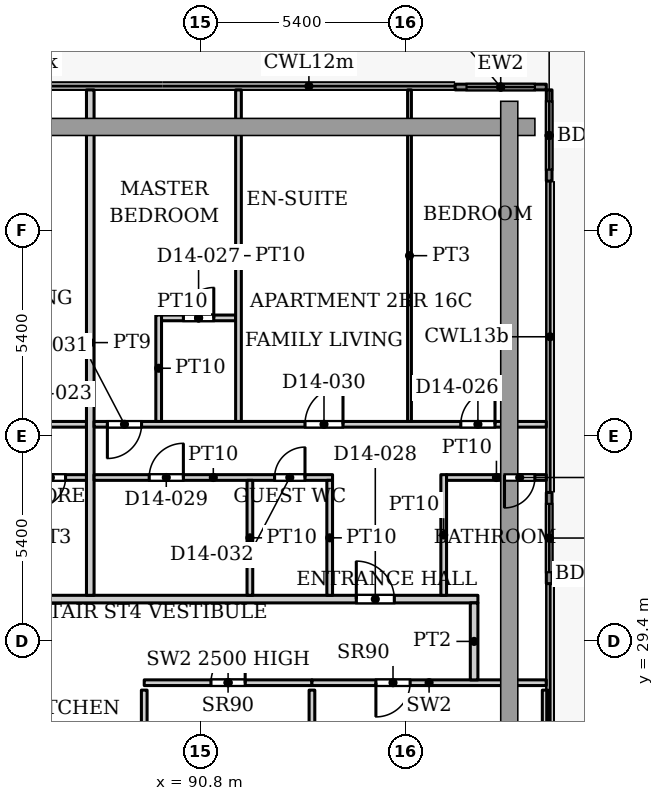
"""IFC4 building model, lengths in metres.
Left out: names, types, materials, properties, quantities, classifications, styles, units other than length and angle.
Written with IfcOpenShell. Run it as: python <this file> out.ifc"""

import sys

from ifc_helpers import new_model, si_unit, direction, frame, frame_2d, origin, place, context, subcontext, project, spatial, rectangle, extrude, source, transform, mapped, element, fill, save


model = new_model("IFC4")
c1 = context("Model", 3, precision=1e-05, world=origin(), true_north=direction((0.0, 1.0)))
c2 = subcontext(c1, "Body", "Model", "MODEL_VIEW")
j1 = project(units=[si_unit("LENGTHUNIT", "METRE"), si_unit("PLANEANGLEUNIT", "RADIAN")], contexts=[c1])
p1 = place(None, origin())
s1 = spatial("IfcSite", under=j1, at=p1, CompositionType="ELEMENT")
p2 = place(p1, origin())
s2 = spatial("IfcBuilding", under=s1, at=p2, CompositionType="ELEMENT")
p3 = place(p2, frame((0.0, 0.0, 69.5)))
s3 = spatial("IfcBuildingStorey", under=s2, at=p3, CompositionType="ELEMENT", Elevation=69.5)
p4 = place(p3, frame((97.5, 43.975, 0.0), z_axis=(0.0, 0.0, 1.0), x_axis=(1.0, 0.0, 0.0)))
e1 = element("IfcWall", 1, at=p4, inside=s3, PredefinedType="SOLIDWALL", context=c2, shape_type="SweptSolid", body=[
    extrude(rectangle(XDim=2.4, YDim=0.15, at=frame_2d((1.2, 0.0))), origin(), (0.0, 0.0, 1.0), 3.75),
])
p5 = place(p4, frame((0.3, 0.0, 0.0)))
e2 = element("IfcOpeningElement", 2, at=p5, cuts=e1, PredefinedType="OPENING", context=c2, shape_type="SweptSolid", body=[
    extrude(rectangle(XDim=1.8, YDim=2.4, at=frame_2d((0.9, 1.2))), frame((0.0, 0.085, 0.0), z_axis=(0.0, -1.0, 0.0), x_axis=(1.0, 0.0, 0.0)), (0.0, 0.0, 1.0), 0.17),
])
p6 = place(p3, frame((99.975, 43.9, 0.0), z_axis=(0.0, 0.0, 1.0), x_axis=(0.0, -1.0, 0.0)))
e3 = element("IfcWall", 3, at=p6, inside=s3, PredefinedType="SOLIDWALL", context=c2, shape_type="SweptSolid", body=[
    extrude(rectangle(XDim=2.4, YDim=0.15, at=frame_2d((1.2, 0.0))), origin(), (0.0, 0.0, 1.0), 3.75),
])
p7 = place(p6, frame((0.3, 0.0, 0.0)))
e4 = element("IfcOpeningElement", 4, at=p7, cuts=e3, PredefinedType="OPENING", context=c2, shape_type="SweptSolid", body=[
    extrude(rectangle(XDim=1.8, YDim=2.4, at=frame_2d((0.9, 1.2))), frame((0.0, 0.085, 0.0), z_axis=(0.0, -1.0, 0.0), x_axis=(1.0, 0.0, 0.0)), (0.0, 0.0, 1.0), 0.17),
])
p8 = place(p3, frame((99.975, 33.307, 0.0), z_axis=(0.0, 0.0, 1.0), x_axis=(0.0, -1.0, 0.0)))
e5 = element("IfcWall", 5, at=p8, inside=s3, PredefinedType="SOLIDWALL", context=c2, shape_type="SweptSolid", body=[
    extrude(rectangle(XDim=2.4, YDim=0.15, at=frame_2d((1.2, 0.0))), origin(), (0.0, 0.0, 1.0), 3.75),
])
p9 = place(p8, frame((0.3, 0.0, 0.0)))
e6 = element("IfcOpeningElement", 6, at=p9, cuts=e5, PredefinedType="OPENING", context=c2, shape_type="SweptSolid", body=[
    extrude(rectangle(XDim=1.8, YDim=2.4, at=frame_2d((0.9, 1.2))), frame((0.0, 0.085, 0.0), z_axis=(0.0, -1.0, 0.0), x_axis=(1.0, 0.0, 0.0)), (0.0, 0.0, 1.0), 0.17),
])
p10 = place(p3, frame((89.32, 28.3, 0.0), z_axis=(0.0, 0.0, 1.0), x_axis=(1.0, 0.0, 0.0)))
e7 = element("IfcWall", 7, at=p10, inside=s3, PredefinedType="PARTITIONING", context=c2, shape_type="SweptSolid", body=[
    extrude(rectangle(XDim=4.413, YDim=0.15, at=frame_2d((2.207, 0.0))), origin(), (0.0, 0.0, 1.0), 2.5),
])
p11 = place(p10, frame((1.756, 0.0, 0.0)))
e8 = element("IfcOpeningElement", 8, at=p11, cuts=e7, PredefinedType="OPENING", context=c2, shape_type="SweptSolid", body=[
    extrude(rectangle(XDim=0.9, YDim=2.2, at=frame_2d((0.45, 1.1))), frame((0.0, 0.085, 0.0), z_axis=(0.0, -1.0, 0.0), x_axis=(1.0, 0.0, 0.0)), (0.0, 0.0, 1.0), 0.17),
])
p12 = place(p3, frame((89.32, 25.62, 0.0), z_axis=(0.0, 0.0, 1.0), x_axis=(0.0, 1.0, 0.0)))
e9 = element("IfcWall", 9, at=p12, inside=s3, PredefinedType="PARTITIONING", context=c2, shape_type="SweptSolid", body=[
    extrude(rectangle(XDim=2.485, YDim=0.15, at=frame_2d((1.242, 0.0))), origin(), (0.0, 0.0, 1.0), 3.9),
])
p13 = place(p3, frame((93.733, 21.338, 0.0), z_axis=(0.0, 0.0, 1.0), x_axis=(0.0, 1.0, 0.0)))
e10 = element("IfcWall", 10, at=p13, inside=s3, PredefinedType="PARTITIONING", context=c2, shape_type="SweptSolid", body=[
    extrude(rectangle(XDim=6.767, YDim=0.15, at=frame_2d((3.384, 0.0))), origin(), (0.0, 0.0, 1.0), 3.9),
])
p14 = place(p3, frame((93.733, 28.3, 0.0), z_axis=(0.0, 0.0, 1.0), x_axis=(1.0, 0.0, 0.0)))
e11 = element("IfcWall", 11, at=p14, inside=s3, PredefinedType="PARTITIONING", context=c2, shape_type="SweptSolid", body=[
    extrude(rectangle(XDim=6.165, YDim=0.15, at=frame_2d((3.083, 0.0))), origin(), (0.0, 0.0, 1.0), 3.9),
])
p15 = place(p14, frame((1.683, 0.0, 0.0)))
e12 = element("IfcOpeningElement", 12, at=p15, cuts=e11, PredefinedType="OPENING", context=c2, shape_type="SweptSolid", body=[
    extrude(rectangle(XDim=0.9, YDim=2.2, at=frame_2d((0.45, 1.1))), frame((0.0, 0.085, 0.0), z_axis=(0.0, -1.0, 0.0), x_axis=(1.0, 0.0, 0.0)), (0.0, 0.0, 1.0), 0.17),
])
p16 = place(p3, frame((99.87, 21.015, 0.0), z_axis=(0.0, 0.0, 1.0), x_axis=(0.0, 1.0, 0.0)))
e13 = element("IfcWall", 13, at=p16, inside=s3, PredefinedType="PARTITIONING", context=c2, shape_type="SweptSolid", body=[
    extrude(rectangle(XDim=7.09, YDim=0.15, at=frame_2d((3.545, 0.0))), origin(), (0.0, 0.0, 1.0), 3.9),
])
p17 = place(p3, frame((55.9, 30.5, 0.0), z_axis=(0.0, 0.0, 1.0), x_axis=(1.0, 0.0, 0.0)))
e14 = element("IfcWall", 14, at=p17, inside=s3, PredefinedType="PARTITIONING", context=c2, shape_type="SweptSolid", body=[
    extrude(rectangle(XDim=42.2, YDim=0.2, at=frame_2d((21.1, 0.0))), origin(), (0.0, 0.0, 1.0), 3.6),
])
p18 = place(p17, frame((14.7, 0.0, 0.0)))
e15 = element("IfcOpeningElement", 15, at=p18, cuts=e14, PredefinedType="OPENING", context=c2, shape_type="SweptSolid", body=[
    extrude(rectangle(XDim=1.0, YDim=2.1, at=frame_2d((0.5, 1.05))), frame((0.0, 0.11, 0.0), z_axis=(0.0, -1.0, 0.0), x_axis=(1.0, 0.0, 0.0)), (0.0, 0.0, 1.0), 0.22),
])
p19 = place(p17, frame((27.9, 0.0, 0.0)))
e16 = element("IfcOpeningElement", 16, at=p19, cuts=e14, PredefinedType="OPENING", context=c2, shape_type="SweptSolid", body=[
    extrude(rectangle(XDim=1.0, YDim=2.1, at=frame_2d((0.5, 1.05))), frame((0.0, 0.11, 0.0), z_axis=(0.0, -1.0, 0.0), x_axis=(1.0, 0.0, 0.0)), (0.0, 0.0, 1.0), 0.22),
])
p20 = place(p17, frame((39.0, 0.0, 0.0)))
e17 = element("IfcOpeningElement", 17, at=p20, cuts=e14, PredefinedType="OPENING", context=c2, shape_type="SweptSolid", body=[
    extrude(rectangle(XDim=1.0, YDim=2.1, at=frame_2d((0.5, 1.05))), frame((0.0, 0.11, 0.0), z_axis=(0.0, -1.0, 0.0), x_axis=(1.0, 0.0, 0.0)), (0.0, 0.0, 1.0), 0.22),
])
p21 = place(p3, frame((74.5, 35.1, 0.0), z_axis=(0.0, 0.0, 1.0), x_axis=(1.0, 0.0, 0.0)))
e18 = element("IfcWall", 18, at=p21, inside=s3, PredefinedType="PARTITIONING", context=c2, shape_type="SweptSolid", body=[
    extrude(rectangle(XDim=13.3, YDim=0.15, at=frame_2d((6.65, 0.0))), origin(), (0.0, 0.0, 1.0), 3.6),
])
p22 = place(p21, frame((1.1, 0.0, 0.0)))
e19 = element("IfcOpeningElement", 19, at=p22, cuts=e18, PredefinedType="OPENING", context=c2, shape_type="SweptSolid", body=[
    extrude(rectangle(XDim=0.9, YDim=2.1, at=frame_2d((0.45, 1.05))), frame((0.0, 0.085, 0.0), z_axis=(0.0, -1.0, 0.0), x_axis=(1.0, 0.0, 0.0)), (0.0, 0.0, 1.0), 0.17),
])
p23 = place(p21, frame((9.95, 0.0, 0.0)))
e20 = element("IfcOpeningElement", 20, at=p23, cuts=e18, PredefinedType="OPENING", context=c2, shape_type="SweptSolid", body=[
    extrude(rectangle(XDim=1.0, YDim=2.1, at=frame_2d((0.5, 1.05))), frame((0.0, 0.085, 0.0), z_axis=(0.0, -1.0, 0.0), x_axis=(1.0, 0.0, 0.0)), (0.0, 0.0, 1.0), 0.17),
])
p24 = place(p21, frame((4.25, 0.0, 0.0)))
e21 = element("IfcOpeningElement", 21, at=p24, cuts=e18, PredefinedType="OPENING", context=c2, shape_type="SweptSolid", body=[
    extrude(rectangle(XDim=0.9, YDim=2.1, at=frame_2d((0.45, 1.05))), frame((0.0, 0.085, 0.0), z_axis=(0.0, -1.0, 0.0), x_axis=(1.0, 0.0, 0.0)), (0.0, 0.0, 1.0), 0.17),
])
p25 = place(p3, frame((85.75, 33.7, 0.0), z_axis=(0.0, 0.0, 1.0), x_axis=(1.0, 0.0, 0.0)))
e22 = element("IfcWall", 22, at=p25, inside=s3, PredefinedType="PARTITIONING", context=c2, shape_type="SweptSolid", body=[
    extrude(rectangle(XDim=2.05, YDim=0.15, at=frame_2d((1.025, 0.0))), origin(), (0.0, 0.0, 1.0), 3.6),
])
p26 = place(p25, frame((0.7, 0.0, 0.0)))
e23 = element("IfcOpeningElement", 23, at=p26, cuts=e22, PredefinedType="OPENING", context=c2, shape_type="SweptSolid", body=[
    extrude(rectangle(XDim=0.8, YDim=2.1, at=frame_2d((0.4, 1.05))), frame((0.0, 0.085, 0.0), z_axis=(0.0, -1.0, 0.0), x_axis=(1.0, 0.0, 0.0)), (0.0, 0.0, 1.0), 0.17),
])
p27 = place(p3, frame((87.9, 30.6, 0.0), z_axis=(0.0, 0.0, 1.0), x_axis=(0.0, 1.0, 0.0)))
e24 = element("IfcWall", 24, at=p27, inside=s3, PredefinedType="PARTITIONING", context=c2, shape_type="SweptSolid", body=[
    extrude(rectangle(XDim=13.3, YDim=0.2, at=frame_2d((6.65, 0.0))), origin(), (0.0, 0.0, 1.0), 3.6),
])
p28 = place(p3, frame((88.0, 33.7, 0.0), z_axis=(0.0, 0.0, 1.0), x_axis=(1.0, 0.0, 0.0)))
e25 = element("IfcWall", 25, at=p28, inside=s3, PredefinedType="PARTITIONING", context=c2, shape_type="SweptSolid", body=[
    extrude(rectangle(XDim=6.275, YDim=0.15, at=frame_2d((3.137, 0.0))), origin(), (0.0, 0.0, 1.0), 3.6),
])
p29 = place(p28, frame((1.45, 0.0, 0.0)))
e26 = element("IfcOpeningElement", 26, at=p29, cuts=e25, PredefinedType="OPENING", context=c2, shape_type="SweptSolid", body=[
    extrude(rectangle(XDim=0.9, YDim=2.1, at=frame_2d((0.45, 1.05))), frame((0.0, 0.085, 0.0), z_axis=(0.0, -1.0, 0.0), x_axis=(1.0, 0.0, 0.0)), (0.0, 0.0, 1.0), 0.17),
])
p30 = place(p28, frame((4.75, 0.0, 0.0)))
e27 = element("IfcOpeningElement", 27, at=p30, cuts=e25, PredefinedType="OPENING", context=c2, shape_type="SweptSolid", body=[
    extrude(rectangle(XDim=0.8, YDim=2.1, at=frame_2d((0.4, 1.05))), frame((0.0, 0.085, 0.0), z_axis=(0.0, -1.0, 0.0), x_axis=(1.0, 0.0, 0.0)), (0.0, 0.0, 1.0), 0.17),
])
p31 = place(p3, frame((88.0, 35.1, 0.0), z_axis=(0.0, 0.0, 1.0), x_axis=(1.0, 0.0, 0.0)))
e28 = element("IfcWall", 28, at=p31, inside=s3, PredefinedType="PARTITIONING", context=c2, shape_type="SweptSolid", body=[
    extrude(rectangle(XDim=11.9, YDim=0.15, at=frame_2d((5.95, 0.0))), origin(), (0.0, 0.0, 1.0), 3.6),
])
p32 = place(p31, frame((9.65, 0.0, 0.0)))
e29 = element("IfcOpeningElement", 29, at=p32, cuts=e28, PredefinedType="OPENING", context=c2, shape_type="SweptSolid", body=[
    extrude(rectangle(XDim=0.9, YDim=2.1, at=frame_2d((0.45, 1.05))), frame((0.0, 0.085, 0.0), z_axis=(0.0, -1.0, 0.0), x_axis=(1.0, 0.0, 0.0)), (0.0, 0.0, 1.0), 0.17),
])
p33 = place(p31, frame((5.55, 0.0, 0.0)))
e30 = element("IfcOpeningElement", 30, at=p33, cuts=e28, PredefinedType="OPENING", context=c2, shape_type="SweptSolid", body=[
    extrude(rectangle(XDim=1.0, YDim=2.1, at=frame_2d((0.5, 1.05))), frame((0.0, 0.085, 0.0), z_axis=(0.0, -1.0, 0.0), x_axis=(1.0, 0.0, 0.0)), (0.0, 0.0, 1.0), 0.17),
])
p34 = place(p31, frame((0.35, 0.0, 0.0)))
e31 = element("IfcOpeningElement", 31, at=p34, cuts=e28, PredefinedType="OPENING", context=c2, shape_type="SweptSolid", body=[
    extrude(rectangle(XDim=0.9, YDim=2.1, at=frame_2d((0.45, 1.05))), frame((0.0, 0.085, 0.0), z_axis=(0.0, -1.0, 0.0), x_axis=(1.0, 0.0, 0.0)), (0.0, 0.0, 1.0), 0.17),
])
p35 = place(p3, frame((89.7, 35.175, 0.0), z_axis=(0.0, 0.0, 1.0), x_axis=(0.0, 1.0, 0.0)))
e32 = element("IfcWall", 32, at=p35, inside=s3, PredefinedType="PARTITIONING", context=c2, shape_type="SweptSolid", body=[
    extrude(rectangle(XDim=2.8, YDim=0.15, at=frame_2d((1.4, 0.0))), origin(), (0.0, 0.0, 1.0), 3.6),
])
p36 = place(p3, frame((89.775, 37.9, 0.0), z_axis=(0.0, 0.0, 1.0), x_axis=(1.0, 0.0, 0.0)))
e33 = element("IfcWall", 33, at=p36, inside=s3, PredefinedType="PARTITIONING", context=c2, shape_type="SweptSolid", body=[
    extrude(rectangle(XDim=1.95, YDim=0.15, at=frame_2d((0.975, 0.0))), origin(), (0.0, 0.0, 1.0), 3.6),
])
p37 = place(p36, frame((0.575, 0.0, 0.0)))
e34 = element("IfcOpeningElement", 34, at=p37, cuts=e33, PredefinedType="OPENING", context=c2, shape_type="SweptSolid", body=[
    extrude(rectangle(XDim=0.8, YDim=2.1, at=frame_2d((0.4, 1.05))), frame((0.0, 0.085, 0.0), z_axis=(0.0, -1.0, 0.0), x_axis=(1.0, 0.0, 0.0)), (0.0, 0.0, 1.0), 0.17),
])
p38 = place(p3, frame((91.8, 35.175, 0.0), z_axis=(0.0, 0.0, 1.0), x_axis=(0.0, 1.0, 0.0)))
e35 = element("IfcWall", 35, at=p38, inside=s3, PredefinedType="PARTITIONING", context=c2, shape_type="SweptSolid", body=[
    extrude(rectangle(XDim=8.725, YDim=0.15, at=frame_2d((4.362, 0.0))), origin(), (0.0, 0.0, 1.0), 3.6),
])
for number, where, z_axis, x_axis in (
    (36, (92.1, 30.6, 0.0), (0.0, 0.0, 1.0), (0.0, 1.0, 0.0)),
    (37, (94.2, 30.6, 0.0), (0.0, 0.0, 1.0), (0.0, 1.0, 0.0)),
):
    element("IfcWall", number, at=place(p3, frame(where, z_axis=z_axis, x_axis=x_axis)), inside=s3, PredefinedType="PARTITIONING", context=c2, shape_type="SweptSolid", body=[
        extrude(rectangle(XDim=3.025, YDim=0.15, at=frame_2d((1.512, 0.0))), origin(), (0.0, 0.0, 1.0), 3.6),
    ])
p39 = place(p3, frame((96.3, 35.175, 0.0), z_axis=(0.0, 0.0, 1.0), x_axis=(0.0, 1.0, 0.0)))
e38 = element("IfcWall", 38, at=p39, inside=s3, PredefinedType="PARTITIONING", context=c2, shape_type="SweptSolid", body=[
    extrude(rectangle(XDim=8.725, YDim=0.1, at=frame_2d((4.362, 0.0))), origin(), (0.0, 0.0, 1.0), 3.6),
])
p40 = place(p3, frame((97.2, 30.6, 0.0), z_axis=(0.0, 0.0, 1.0), x_axis=(0.0, 1.0, 0.0)))
e39 = element("IfcWall", 39, at=p40, inside=s3, PredefinedType="PARTITIONING", context=c2, shape_type="SweptSolid", body=[
    extrude(rectangle(XDim=3.175, YDim=0.15, at=frame_2d((1.587, 0.0))), origin(), (0.0, 0.0, 1.0), 3.6),
])
p41 = place(p3, frame((97.275, 33.7, 0.0), z_axis=(0.0, 0.0, 1.0), x_axis=(1.0, 0.0, 0.0)))
e40 = element("IfcWall", 40, at=p41, inside=s3, PredefinedType="PARTITIONING", context=c2, shape_type="SweptSolid", body=[
    extrude(rectangle(XDim=2.625, YDim=0.15, at=frame_2d((1.312, 0.0))), origin(), (0.0, 0.0, 1.0), 3.6),
])
p42 = place(p41, frame((1.525, 0.0, 0.0)))
e41 = element("IfcOpeningElement", 41, at=p42, cuts=e40, PredefinedType="OPENING", context=c2, shape_type="SweptSolid", body=[
    extrude(rectangle(XDim=0.8, YDim=2.1, at=frame_2d((0.4, 1.05))), frame((0.0, 0.085, 0.0), z_axis=(0.0, -1.0, 0.0), x_axis=(1.0, 0.0, 0.0)), (0.0, 0.0, 1.0), 0.17),
])
p43 = place(p3, frame((98.0, 28.374, 0.0), z_axis=(0.0, 0.0, 1.0), x_axis=(0.0, 1.0, 0.0)))
e42 = element("IfcWall", 42, at=p43, inside=s3, PredefinedType="PARTITIONING", context=c2, shape_type="SweptSolid", body=[
    extrude(rectangle(XDim=2.026, YDim=0.2, at=frame_2d((1.013, 0.0))), origin(), (0.0, 0.0, 1.0), 3.6),
])
m1 = source(origin(), c2, "Body", "SweptSolid", [
    extrude(rectangle(XDim=1.8, YDim=2.4, at=frame_2d((0.9, 1.2))), frame((0.0, 0.025, 0.0), z_axis=(0.0, -1.0, 0.0), x_axis=(1.0, 0.0, 0.0)), (0.0, 0.0, 1.0), 0.05),
])
p44 = place(p5, origin())
e43 = element("IfcDoor", 43, at=p44, inside=s3, OperationType="SLIDING_TO_LEFT", PredefinedType="DOOR", context=c2, shape_type="MappedRepresentation", body=[
    mapped(m1, transform((0.0, 0.0, 0.0), x_axis=(1.0, 0.0, 0.0), y_axis=(0.0, 1.0, 0.0), z_axis=(0.0, 0.0, 1.0), scale=1.0)),
])
fill(e2, e43)
p45 = place(p7, origin())
e44 = element("IfcDoor", 44, at=p45, inside=s3, OperationType="SLIDING_TO_LEFT", PredefinedType="DOOR", context=c2, shape_type="MappedRepresentation", body=[
    mapped(m1, transform((0.0, 0.0, 0.0), x_axis=(1.0, 0.0, 0.0), y_axis=(0.0, 1.0, 0.0), z_axis=(0.0, 0.0, 1.0), scale=1.0)),
])
fill(e4, e44)
p46 = place(p9, origin())
e45 = element("IfcDoor", 45, at=p46, inside=s3, OperationType="SLIDING_TO_LEFT", PredefinedType="DOOR", context=c2, shape_type="MappedRepresentation", body=[
    mapped(m1, transform((0.0, 0.0, 0.0), x_axis=(1.0, 0.0, 0.0), y_axis=(0.0, 1.0, 0.0), z_axis=(0.0, 0.0, 1.0), scale=1.0)),
])
fill(e6, e45)
m2 = source(origin(), c2, "Body", "SweptSolid", [
    extrude(rectangle(XDim=0.9, YDim=2.2, at=frame_2d((0.45, 1.1))), frame((0.0, 0.025, 0.0), z_axis=(0.0, -1.0, 0.0), x_axis=(1.0, 0.0, 0.0)), (0.0, 0.0, 1.0), 0.05),
])
p47 = place(p11, origin())
e46 = element("IfcDoor", 46, at=p47, inside=s3, OperationType="SINGLE_SWING_LEFT", PredefinedType="DOOR", context=c2, shape_type="MappedRepresentation", body=[
    mapped(m2, transform((0.0, 0.0, 0.0), x_axis=(1.0, 0.0, 0.0), y_axis=(0.0, 1.0, 0.0), z_axis=(0.0, 0.0, 1.0), scale=1.0)),
])
fill(e8, e46)
p48 = place(p15, origin())
e47 = element("IfcDoor", 47, at=p48, inside=s3, OperationType="SINGLE_SWING_RIGHT", PredefinedType="DOOR", context=c2, shape_type="MappedRepresentation", body=[
    mapped(m2, transform((0.0, 0.0, 0.0), x_axis=(1.0, 0.0, 0.0), y_axis=(0.0, 1.0, 0.0), z_axis=(0.0, 0.0, 1.0), scale=1.0)),
])
fill(e12, e47)
m3 = source(origin(), c2, "Body", "SweptSolid", [
    extrude(rectangle(XDim=0.8, YDim=2.1, at=frame_2d((0.4, 1.05))), frame((0.0, 0.025, 0.0), z_axis=(0.0, -1.0, 0.0), x_axis=(1.0, 0.0, 0.0)), (0.0, 0.0, 1.0), 0.05),
])
p49 = place(p26, origin())
e48 = element("IfcDoor", 48, at=p49, inside=s3, OperationType="SINGLE_SWING_RIGHT", PredefinedType="DOOR", context=c2, shape_type="MappedRepresentation", body=[
    mapped(m3, transform((0.0, 0.0, 0.0), x_axis=(1.0, 0.0, 0.0), y_axis=(0.0, 1.0, 0.0), z_axis=(0.0, 0.0, 1.0), scale=1.0)),
])
fill(e23, e48)
p50 = place(p42, origin())
e49 = element("IfcDoor", 49, at=p50, inside=s3, OperationType="SINGLE_SWING_RIGHT", PredefinedType="DOOR", context=c2, shape_type="MappedRepresentation", body=[
    mapped(m3, transform((0.0, 0.0, 0.0), x_axis=(1.0, 0.0, 0.0), y_axis=(0.0, 1.0, 0.0), z_axis=(0.0, 0.0, 1.0), scale=1.0)),
])
fill(e41, e49)
m4 = source(origin(), c2, "Body", "SweptSolid", [
    extrude(rectangle(XDim=0.9, YDim=2.1, at=frame_2d((0.45, 1.05))), frame((0.0, 0.025, 0.0), z_axis=(0.0, -1.0, 0.0), x_axis=(1.0, 0.0, 0.0)), (0.0, 0.0, 1.0), 0.05),
])
p51 = place(p32, origin())
e50 = element("IfcDoor", 50, at=p51, inside=s3, OperationType="SINGLE_SWING_LEFT", PredefinedType="DOOR", context=c2, shape_type="MappedRepresentation", body=[
    mapped(m4, transform((0.0, 0.0, 0.0), x_axis=(1.0, 0.0, 0.0), y_axis=(0.0, 1.0, 0.0), z_axis=(0.0, 0.0, 1.0), scale=1.0)),
])
fill(e29, e50)
p52 = place(p37, origin())
e51 = element("IfcDoor", 51, at=p52, inside=s3, OperationType="SINGLE_SWING_LEFT", PredefinedType="DOOR", context=c2, shape_type="MappedRepresentation", body=[
    mapped(m3, transform((0.0, 0.0, 0.0), x_axis=(1.0, 0.0, 0.0), y_axis=(0.0, 1.0, 0.0), z_axis=(0.0, 0.0, 1.0), scale=1.0)),
])
fill(e34, e51)
m5 = source(origin(), c2, "Body", "SweptSolid", [
    extrude(rectangle(XDim=1.0, YDim=2.1, at=frame_2d((0.5, 1.05))), frame((0.0, 0.025, 0.0), z_axis=(0.0, -1.0, 0.0), x_axis=(1.0, 0.0, 0.0)), (0.0, 0.0, 1.0), 0.05),
])
p53 = place(p20, origin())
e52 = element("IfcDoor", 52, at=p53, inside=s3, OperationType="SINGLE_SWING_LEFT", PredefinedType="DOOR", context=c2, shape_type="MappedRepresentation", body=[
    mapped(m5, transform((0.0, 0.0, 0.0), x_axis=(1.0, 0.0, 0.0), y_axis=(0.0, 1.0, 0.0), z_axis=(0.0, 0.0, 1.0), scale=1.0)),
])
fill(e17, e52)
p54 = place(p29, origin())
e53 = element("IfcDoor", 53, at=p54, inside=s3, OperationType="SINGLE_SWING_LEFT", PredefinedType="DOOR", context=c2, shape_type="MappedRepresentation", body=[
    mapped(m4, transform((0.0, 0.0, 0.0), x_axis=(1.0, 0.0, 0.0), y_axis=(0.0, 1.0, 0.0), z_axis=(0.0, 0.0, 1.0), scale=1.0)),
])
fill(e26, e53)
m6 = source(origin(), c2, "Body", "SweptSolid", [
    extrude(rectangle(XDim=1.0, YDim=2.1, at=frame_2d((0.5, 1.05))), frame((0.0, 0.025, 0.0), z_axis=(0.0, -1.0, 0.0), x_axis=(1.0, 0.0, 0.0)), (0.0, 0.0, 1.0), 0.05),
])
p55 = place(p33, origin())
e54 = element("IfcDoor", 54, at=p55, inside=s3, OperationType="SINGLE_SWING_LEFT", PredefinedType="DOOR", context=c2, shape_type="MappedRepresentation", body=[
    mapped(m6, transform((0.0, 0.0, 0.0), x_axis=(1.0, 0.0, 0.0), y_axis=(0.0, 1.0, 0.0), z_axis=(0.0, 0.0, 1.0), scale=1.0)),
])
fill(e30, e54)
p56 = place(p34, origin())
e55 = element("IfcDoor", 55, at=p56, inside=s3, OperationType="SINGLE_SWING_RIGHT", PredefinedType="DOOR", context=c2, shape_type="MappedRepresentation", body=[
    mapped(m4, transform((0.0, 0.0, 0.0), x_axis=(1.0, 0.0, 0.0), y_axis=(0.0, 1.0, 0.0), z_axis=(0.0, 0.0, 1.0), scale=1.0)),
])
fill(e31, e55)
p57 = place(p30, origin())
e56 = element("IfcDoor", 56, at=p57, inside=s3, OperationType="SINGLE_SWING_LEFT", PredefinedType="DOOR", context=c2, shape_type="MappedRepresentation", body=[
    mapped(m3, transform((0.0, 0.0, 0.0), x_axis=(1.0, 0.0, 0.0), y_axis=(0.0, 1.0, 0.0), z_axis=(0.0, 0.0, 1.0), scale=1.0)),
])
fill(e27, e56)
save(model, sys.argv[1])
